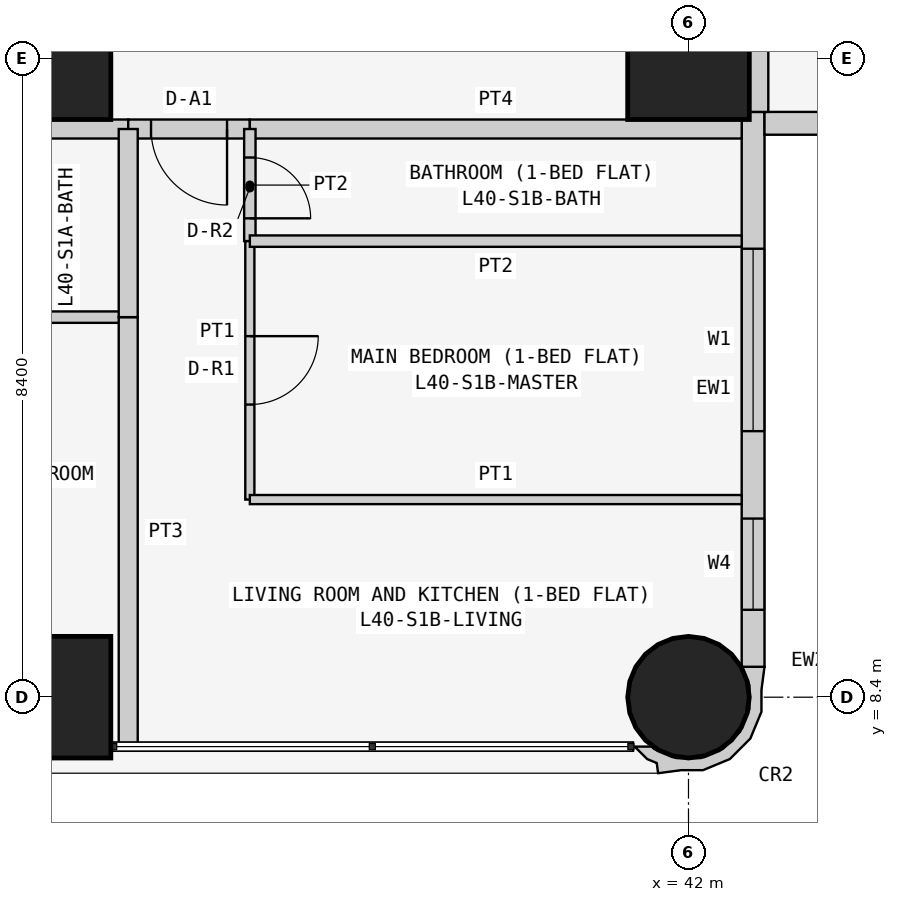
"""IFC4 building model, lengths in metres.
Left out: names, types, materials, properties, quantities, classifications, styles, units other than length and angle.
Written with IfcOpenShell. Run it as: python <this file> out.ifc"""

import sys

from ifc_helpers import new_model, si_unit, direction, frame, frame_2d, origin, origin_2d, place, context, subcontext, project, spatial, polyline, rectangle, circle, outline, extrude, element, fill, save


model = new_model("IFC4")
c1 = context("Model", 3, precision=1e-05, world=origin(), true_north=direction((0.0, 1.0)))
c2 = subcontext(c1, "Body", "Model", "MODEL_VIEW")
j1 = project(units=[si_unit("LENGTHUNIT", "METRE"), si_unit("PLANEANGLEUNIT", "RADIAN")], contexts=[c1])
p1 = place(None, origin())
s1 = spatial("IfcSite", under=j1, at=p1, CompositionType="ELEMENT")
p2 = place(p1, origin())
s2 = spatial("IfcBuilding", under=s1, at=p2, CompositionType="ELEMENT")
p3 = place(p2, frame((0.0, 0.0, 155.7)))
s3 = spatial("IfcBuildingStorey", under=s2, at=p3, CompositionType="ELEMENT", Elevation=155.7)
for number, where, z_axis, x_axis in (
    (1, (33.6, 8.4, 0.0), (0.0, 0.0, 1.0), (1.0, 0.0, 0.0)),
    (2, (33.6, 16.8, 0.0), (0.0, 0.0, 1.0), (1.0, 0.0, 0.0)),
):
    element("IfcColumn", number, at=place(p3, frame(where, z_axis=z_axis, x_axis=x_axis)), inside=s3, PredefinedType="COLUMN", context=c2, shape_type="SweptSolid", body=[
        extrude(rectangle(XDim=1.6, YDim=1.6, at=origin_2d()), origin(), (0.0, 0.0, 1.0), 3.6),
    ])
p4 = place(p3, frame((42.0, 8.4, 0.0), z_axis=(0.0, 0.0, 1.0), x_axis=(1.0, 0.0, 0.0)))
e3 = element("IfcColumn", 3, at=p4, inside=s3, PredefinedType="COLUMN", context=c2, shape_type="SweptSolid", body=[
    extrude(circle(Radius=0.8, at=origin_2d()), origin(), (0.0, 0.0, 1.0), 3.6),
])
p5 = place(p3, frame((42.0, 16.8, 0.0), z_axis=(0.0, 0.0, 1.0), x_axis=(1.0, 0.0, 0.0)))
e4 = element("IfcColumn", 4, at=p5, inside=s3, PredefinedType="COLUMN", context=c2, shape_type="SweptSolid", body=[
    extrude(rectangle(XDim=1.6, YDim=1.6, at=origin_2d()), origin(), (0.0, 0.0, 1.0), 3.6),
])
p6 = place(p3, frame((42.85, 8.8, 0.0), z_axis=(0.0, 0.0, 1.0), x_axis=(0.0, 1.0, 0.0)))
e5 = element("IfcWall", 5, at=p6, inside=s3, PredefinedType="SOLIDWALL", context=c2, shape_type="SweptSolid", body=[
    extrude(rectangle(XDim=7.3, YDim=0.3, at=frame_2d((3.65, 0.0))), origin(), (0.0, 0.0, 1.0), 3.45),
])
p7 = place(p6, frame((3.1, 0.0, 0.9)))
e6 = element("IfcOpeningElement", 6, at=p7, cuts=e5, PredefinedType="OPENING", context=c2, shape_type="SweptSolid", body=[
    extrude(rectangle(XDim=2.4, YDim=1.5, at=frame_2d((1.2, 0.75))), frame((0.0, 0.16, 0.0), z_axis=(0.0, -1.0, 0.0), x_axis=(1.0, 0.0, 0.0)), (0.0, 0.0, 1.0), 0.32),
])
p8 = place(p6, frame((0.75, 0.0, 0.9)))
e7 = element("IfcOpeningElement", 7, at=p8, cuts=e5, PredefinedType="OPENING", context=c2, shape_type="SweptSolid", body=[
    extrude(rectangle(XDim=1.2, YDim=1.5, at=frame_2d((0.6, 0.75))), frame((0.0, 0.16, 0.0), z_axis=(0.0, -1.0, 0.0), x_axis=(1.0, 0.0, 0.0)), (0.0, 0.0, 1.0), 0.32),
])
p9 = place(p3, frame((43.0, 15.95, 0.0), z_axis=(0.0, 0.0, 1.0), x_axis=(1.0, 0.0, 0.0)))
e8 = element("IfcWall", 8, at=p9, inside=s3, PredefinedType="SOLIDWALL", context=c2, shape_type="SweptSolid", body=[
    extrude(rectangle(XDim=15.4, YDim=0.3, at=frame_2d((7.7, 0.0))), origin(), (0.0, 0.0, 1.0), 3.45),
])
p10 = place(p9, frame((1.2, 0.0, 0.9)))
e9 = element("IfcOpeningElement", 9, at=p10, cuts=e8, PredefinedType="OPENING", context=c2, shape_type="SweptSolid", body=[
    extrude(rectangle(XDim=1.8, YDim=1.5, at=frame_2d((0.9, 0.75))), frame((0.0, 0.16, 0.0), z_axis=(0.0, -1.0, 0.0), x_axis=(1.0, 0.0, 0.0)), (0.0, 0.0, 1.0), 0.32),
])
p11 = place(p9, frame((4.95, 0.0, 1.5)))
e10 = element("IfcOpeningElement", 10, at=p11, cuts=e8, PredefinedType="OPENING", context=c2, shape_type="SweptSolid", body=[
    extrude(rectangle(XDim=0.9, YDim=0.7, at=frame_2d((0.45, 0.35))), frame((0.0, 0.16, 0.0), z_axis=(0.0, -1.0, 0.0), x_axis=(1.0, 0.0, 0.0)), (0.0, 0.0, 1.0), 0.32),
])
p12 = place(p9, frame((8.5, 0.0, 0.9)))
e11 = element("IfcOpeningElement", 11, at=p12, cuts=e8, PredefinedType="OPENING", context=c2, shape_type="SweptSolid", body=[
    extrude(rectangle(XDim=1.8, YDim=1.5, at=frame_2d((0.9, 0.75))), frame((0.0, 0.16, 0.0), z_axis=(0.0, -1.0, 0.0), x_axis=(1.0, 0.0, 0.0)), (0.0, 0.0, 1.0), 0.32),
])
p13 = place(p9, frame((12.5, 0.0, 0.0)))
e12 = element("IfcOpeningElement", 12, at=p13, cuts=e8, PredefinedType="OPENING", context=c2, shape_type="SweptSolid", body=[
    extrude(rectangle(XDim=0.9, YDim=2.4, at=frame_2d((0.45, 1.2))), frame((0.0, 0.16, 0.0), z_axis=(0.0, -1.0, 0.0), x_axis=(1.0, 0.0, 0.0)), (0.0, 0.0, 1.0), 0.32),
])
p14 = place(p9, frame((13.5, 0.0, 0.9)))
e13 = element("IfcOpeningElement", 13, at=p14, cuts=e8, PredefinedType="OPENING", context=c2, shape_type="SweptSolid", body=[
    extrude(rectangle(XDim=1.2, YDim=1.5, at=frame_2d((0.6, 0.75))), frame((0.0, 0.16, 0.0), z_axis=(0.0, -1.0, 0.0), x_axis=(1.0, 0.0, 0.0)), (0.0, 0.0, 1.0), 0.32),
])
p15 = place(p3, frame((41.352, 7.805, 0.0), z_axis=(0.0, 0.0, 1.0), x_axis=(0.343276641956, -0.93923434088, 0.0)))
e14 = element("IfcWall", 14, at=p15, inside=s3, PredefinedType="SOLIDWALL", context=c2, shape_type="SweptSolid", body=[
    extrude(outline(polyline([(-0.369, 1.89), (-0.509, 1.621), (-0.49, 1.615), (-0.479, 1.609), (-0.211, 1.62), (0.088, 1.511), (0.323, 1.295), (0.457, 1.006), (0.47, 0.688), (0.361, 0.389), (0.145, 0.154), (0.108, 0.136), (0.031, -0.075), (0.241, 0.023), (0.333, 0.124), (0.465, 0.094), (0.532, 0.393), (0.631, 0.663), (0.614, 1.044), (0.453, 1.391), (0.172, 1.649), (-0.097, 1.748), (-0.369, 1.89)])), origin(), (0.0, 0.0, 1.0), 3.45),
])
p16 = place(p3, frame((42.925, 22.571, 0.0), z_axis=(0.0, 0.0, 1.0), x_axis=(0.0, -1.0, 0.0)))
e15 = element("IfcWall", 15, at=p16, inside=s3, PredefinedType="PARTITIONING", context=c2, shape_type="SweptSolid", body=[
    extrude(rectangle(XDim=6.471, YDim=0.25, at=frame_2d((3.235, 0.0))), origin(), (0.0, 0.0, 1.0), 3.45),
])
p17 = place(p3, frame((34.629, 15.875, 0.0), z_axis=(0.0, 0.0, 1.0), x_axis=(-1.0, 0.0, 0.0)))
e16 = element("IfcWall", 16, at=p17, inside=s3, PredefinedType="PARTITIONING", context=c2, shape_type="SweptSolid", body=[
    extrude(rectangle(XDim=2.629, YDim=0.25, at=frame_2d((1.314, 0.0))), origin(), (0.0, 0.0, 1.0), 3.45),
])
p18 = place(p3, frame((36.229, 15.875, 0.0), z_axis=(0.0, 0.0, 1.0), x_axis=(-1.0, 0.0, 0.0)))
e17 = element("IfcWall", 17, at=p18, inside=s3, PredefinedType="PARTITIONING", context=c2, shape_type="SweptSolid", body=[
    extrude(rectangle(XDim=1.6, YDim=0.25, at=frame_2d((0.8, 0.0))), origin(), (0.0, 0.0, 1.0), 3.45),
])
p19 = place(p18, frame((0.3, 0.0, 0.0)))
e18 = element("IfcOpeningElement", 18, at=p19, cuts=e17, PredefinedType="OPENING", context=c2, shape_type="SweptSolid", body=[
    extrude(rectangle(XDim=1.0, YDim=2.1, at=frame_2d((0.5, 1.05))), frame((0.0, 0.135, 0.0), z_axis=(0.0, -1.0, 0.0), x_axis=(1.0, 0.0, 0.0)), (0.0, 0.0, 1.0), 0.27),
])
p20 = place(p3, frame((42.7, 15.875, 0.0), z_axis=(0.0, 0.0, 1.0), x_axis=(-1.0, 0.0, 0.0)))
e19 = element("IfcWall", 19, at=p20, inside=s3, PredefinedType="PARTITIONING", context=c2, shape_type="SweptSolid", body=[
    extrude(rectangle(XDim=6.471, YDim=0.25, at=frame_2d((3.235, 0.0))), origin(), (0.0, 0.0, 1.0), 3.45),
])
p21 = place(p3, frame((32.0, 13.4, 0.0), z_axis=(0.0, 0.0, 1.0), x_axis=(1.0, 0.0, 0.0)))
e20 = element("IfcWall", 20, at=p21, inside=s3, PredefinedType="PARTITIONING", context=c2, shape_type="SweptSolid", body=[
    extrude(rectangle(XDim=2.629, YDim=0.15, at=frame_2d((1.314, 0.0))), origin(), (0.0, 0.0, 1.0), 3.45),
])
p22 = place(p3, frame((34.629, 13.4, 0.0), z_axis=(0.0, 0.0, 1.0), x_axis=(0.0, -1.0, 0.0)))
e21 = element("IfcWall", 21, at=p22, inside=s3, PredefinedType="PARTITIONING", context=c2, shape_type="SweptSolid", body=[
    extrude(rectangle(XDim=5.65, YDim=0.25, at=frame_2d((2.825, 0.0))), origin(), (0.0, 0.0, 1.0), 3.45),
])
p23 = place(p3, frame((34.629, 13.4, 0.0), z_axis=(0.0, 0.0, 1.0), x_axis=(0.0, 1.0, 0.0)))
e22 = element("IfcWall", 22, at=p23, inside=s3, PredefinedType="PARTITIONING", context=c2, shape_type="SweptSolid", body=[
    extrude(rectangle(XDim=2.475, YDim=0.25, at=frame_2d((1.238, 0.0))), origin(), (0.0, 0.0, 1.0), 3.45),
])
p24 = place(p3, frame((36.229, 15.875, 0.0), z_axis=(0.0, 0.0, 1.0), x_axis=(0.0, -1.0, 0.0)))
e23 = element("IfcWall", 23, at=p24, inside=s3, PredefinedType="PARTITIONING", context=c2, shape_type="SweptSolid", body=[
    extrude(rectangle(XDim=1.475, YDim=0.15, at=frame_2d((0.738, 0.0))), origin(), (0.0, 0.0, 1.0), 3.45),
])
p25 = place(p24, frame((0.375, 0.0, 0.0)))
e24 = element("IfcOpeningElement", 24, at=p25, cuts=e23, PredefinedType="OPENING", context=c2, shape_type="SweptSolid", body=[
    extrude(rectangle(XDim=0.8, YDim=2.1, at=frame_2d((0.4, 1.05))), frame((0.0, 0.085, 0.0), z_axis=(0.0, -1.0, 0.0), x_axis=(1.0, 0.0, 0.0)), (0.0, 0.0, 1.0), 0.17),
])
p26 = place(p3, frame((36.229, 14.4, 0.0), z_axis=(0.0, 0.0, 1.0), x_axis=(0.0, -1.0, 0.0)))
e25 = element("IfcWall", 25, at=p26, inside=s3, PredefinedType="PARTITIONING", context=c2, shape_type="SweptSolid", body=[
    extrude(rectangle(XDim=3.4, YDim=0.12, at=frame_2d((1.7, 0.0))), origin(), (0.0, 0.0, 1.0), 3.45),
])
p27 = place(p26, frame((1.25, 0.0, 0.0)))
e26 = element("IfcOpeningElement", 26, at=p27, cuts=e25, PredefinedType="OPENING", context=c2, shape_type="SweptSolid", body=[
    extrude(rectangle(XDim=0.9, YDim=2.1, at=frame_2d((0.45, 1.05))), frame((0.0, 0.07, 0.0), z_axis=(0.0, -1.0, 0.0), x_axis=(1.0, 0.0, 0.0)), (0.0, 0.0, 1.0), 0.14),
])
p28 = place(p3, frame((36.229, 11.0, 0.0), z_axis=(0.0, 0.0, 1.0), x_axis=(1.0, 0.0, 0.0)))
e27 = element("IfcWall", 27, at=p28, inside=s3, PredefinedType="PARTITIONING", context=c2, shape_type="SweptSolid", body=[
    extrude(rectangle(XDim=6.471, YDim=0.12, at=frame_2d((3.235, 0.0))), origin(), (0.0, 0.0, 1.0), 3.45),
])
p29 = place(p3, frame((36.229, 14.4, 0.0), z_axis=(0.0, 0.0, 1.0), x_axis=(1.0, 0.0, 0.0)))
e28 = element("IfcWall", 28, at=p29, inside=s3, PredefinedType="PARTITIONING", context=c2, shape_type="SweptSolid", body=[
    extrude(rectangle(XDim=6.471, YDim=0.15, at=frame_2d((3.235, 0.0))), origin(), (0.0, 0.0, 1.0), 3.45),
])
p30 = place(p7, origin())
e29 = element("IfcWindow", 29, at=p30, inside=s3, PartitioningType="SINGLE_PANEL", PredefinedType="WINDOW", context=c2, shape_type="SweptSolid", body=[
    extrude(rectangle(XDim=2.4, YDim=1.5, at=frame_2d((1.2, 0.75))), frame((0.0, 0.03, 0.0), z_axis=(0.0, -1.0, 0.0), x_axis=(1.0, 0.0, 0.0)), (0.0, 0.0, 1.0), 0.06),
])
fill(e6, e29)
p31 = place(p8, origin())
e30 = element("IfcWindow", 30, at=p31, inside=s3, PartitioningType="SINGLE_PANEL", PredefinedType="WINDOW", context=c2, shape_type="SweptSolid", body=[
    extrude(rectangle(XDim=1.2, YDim=1.5, at=frame_2d((0.6, 0.75))), frame((0.0, 0.03, 0.0), z_axis=(0.0, -1.0, 0.0), x_axis=(1.0, 0.0, 0.0)), (0.0, 0.0, 1.0), 0.06),
])
fill(e7, e30)
p32 = place(p19, origin())
e31 = element("IfcDoor", 31, at=p32, inside=s3, OperationType="SINGLE_SWING_LEFT", PredefinedType="DOOR", context=c2, shape_type="SweptSolid", body=[
    extrude(rectangle(XDim=1.0, YDim=2.1, at=frame_2d((0.5, 1.05))), frame((0.0, 0.025, 0.0), z_axis=(0.0, -1.0, 0.0), x_axis=(1.0, 0.0, 0.0)), (0.0, 0.0, 1.0), 0.05),
])
fill(e18, e31)
p33 = place(p25, origin())
e32 = element("IfcDoor", 32, at=p33, inside=s3, OperationType="SINGLE_SWING_RIGHT", PredefinedType="DOOR", context=c2, shape_type="SweptSolid", body=[
    extrude(rectangle(XDim=0.8, YDim=2.1, at=frame_2d((0.4, 1.05))), frame((0.0, 0.025, 0.0), z_axis=(0.0, -1.0, 0.0), x_axis=(1.0, 0.0, 0.0)), (0.0, 0.0, 1.0), 0.05),
])
fill(e24, e32)
p34 = place(p27, origin())
e33 = element("IfcDoor", 33, at=p34, inside=s3, OperationType="SINGLE_SWING_LEFT", PredefinedType="DOOR", context=c2, shape_type="SweptSolid", body=[
    extrude(rectangle(XDim=0.9, YDim=2.1, at=frame_2d((0.45, 1.05))), frame((0.0, 0.025, 0.0), z_axis=(0.0, -1.0, 0.0), x_axis=(1.0, 0.0, 0.0)), (0.0, 0.0, 1.0), 0.05),
])
fill(e26, e33)
save(model, sys.argv[1])
